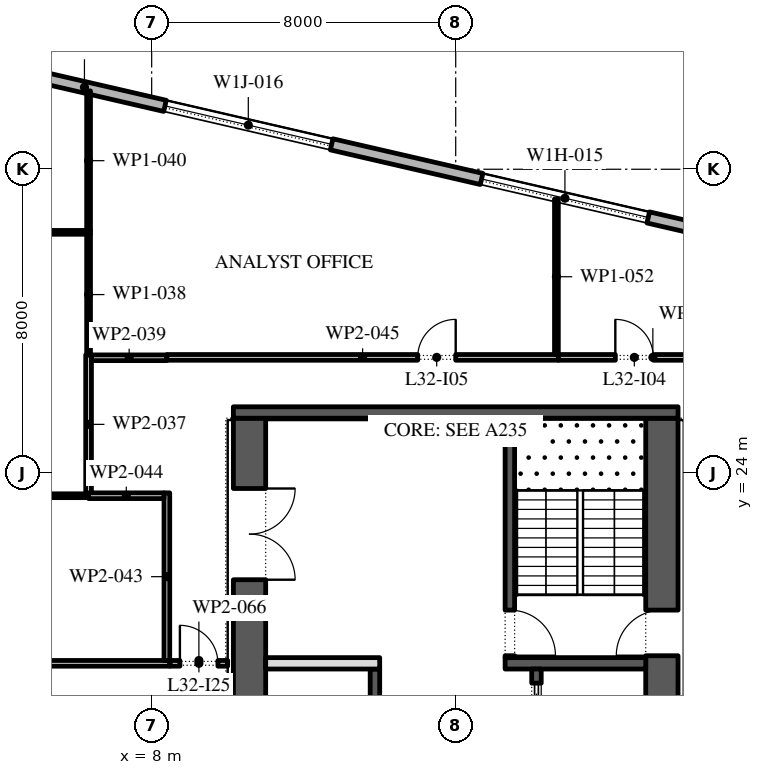
"""IFC4 building model, lengths in metres.
Left out: names, types, materials, properties, quantities, classifications, styles, units other than length and angle.
Written with IfcOpenShell. Run it as: python <this file> out.ifc"""

import sys

from ifc_helpers import new_model, si_unit, direction, frame, frame_2d, origin, place, context, subcontext, project, spatial, rectangle, extrude, element, fill, save


model = new_model("IFC4")
c1 = context("Model", 3, precision=1e-05, world=origin(), true_north=direction((0.0, 1.0)))
c2 = subcontext(c1, "Body", "Model", "MODEL_VIEW")
j1 = project(units=[si_unit("LENGTHUNIT", "METRE"), si_unit("PLANEANGLEUNIT", "RADIAN")], contexts=[c1])
p1 = place(None, origin())
s1 = spatial("IfcSite", under=j1, at=p1, CompositionType="ELEMENT")
p2 = place(p1, origin())
s2 = spatial("IfcBuilding", under=s1, at=p2, CompositionType="ELEMENT")
p3 = place(p2, frame((0.0, 0.0, 147.6)))
s3 = spatial("IfcBuildingStorey", under=s2, at=p3, CompositionType="ELEMENT", Elevation=147.6)
p4 = place(p3, frame((31.078, 28.421, 0.0), z_axis=(0.0, 0.0, 1.0), x_axis=(-0.974370456532, 0.224949357493, 0.0)))
e1 = element("IfcWall", 1, at=p4, inside=s3, PredefinedType="STANDARD", context=c2, shape_type="SweptSolid", body=[
    extrude(rectangle(XDim=51.0, YDim=0.3, at=frame_2d((25.5, 0.0))), origin(), (0.0, 0.0, 1.0), 4.0),
])
p5 = place(p4, frame((1.875, 0.0, 0.45)))
e2 = element("IfcOpeningElement", 2, at=p5, cuts=e1, PredefinedType="OPENING", context=c2, shape_type="SweptSolid", body=[
    extrude(rectangle(XDim=4.5, YDim=2.875, at=frame_2d((2.25, 1.438))), frame((0.0, 0.16, 0.0), z_axis=(0.0, -1.0, 0.0), x_axis=(1.0, 0.0, 0.0)), (0.0, 0.0, 1.0), 0.32),
])
p6 = place(p4, frame((10.275, 0.0, 0.45)))
e3 = element("IfcOpeningElement", 3, at=p6, cuts=e1, PredefinedType="OPENING", context=c2, shape_type="SweptSolid", body=[
    extrude(rectangle(XDim=4.5, YDim=2.75, at=frame_2d((2.25, 1.375))), frame((0.0, 0.16, 0.0), z_axis=(0.0, -1.0, 0.0), x_axis=(1.0, 0.0, 0.0)), (0.0, 0.0, 1.0), 0.32),
])
p7 = place(p4, frame((18.825, 0.0, 0.45)))
e4 = element("IfcOpeningElement", 4, at=p7, cuts=e1, PredefinedType="OPENING", context=c2, shape_type="SweptSolid", body=[
    extrude(rectangle(XDim=4.5, YDim=2.675, at=frame_2d((2.25, 1.337))), frame((0.0, 0.16, 0.0), z_axis=(0.0, -1.0, 0.0), x_axis=(1.0, 0.0, 0.0)), (0.0, 0.0, 1.0), 0.32),
])
p8 = place(p4, frame((28.425, 0.0, 0.0)))
e5 = element("IfcOpeningElement", 5, at=p8, cuts=e1, PredefinedType="OPENING", context=c2, shape_type="SweptSolid", body=[
    extrude(rectangle(XDim=2.4, YDim=3.025, at=frame_2d((1.2, 1.512))), frame((0.0, 0.16, 0.0), z_axis=(0.0, -1.0, 0.0), x_axis=(1.0, 0.0, 0.0)), (0.0, 0.0, 1.0), 0.32),
])
p9 = place(p4, frame((35.925, 0.0, 0.45)))
e6 = element("IfcOpeningElement", 6, at=p9, cuts=e1, PredefinedType="OPENING", context=c2, shape_type="SweptSolid", body=[
    extrude(rectangle(XDim=4.5, YDim=2.525, at=frame_2d((2.25, 1.262))), frame((0.0, 0.16, 0.0), z_axis=(0.0, -1.0, 0.0), x_axis=(1.0, 0.0, 0.0)), (0.0, 0.0, 1.0), 0.32),
])
p10 = place(p4, frame((44.475, 0.0, 0.45)))
e7 = element("IfcOpeningElement", 7, at=p10, cuts=e1, PredefinedType="OPENING", context=c2, shape_type="SweptSolid", body=[
    extrude(rectangle(XDim=4.5, YDim=2.45, at=frame_2d((2.25, 1.225))), frame((0.0, 0.16, 0.0), z_axis=(0.0, -1.0, 0.0), x_axis=(1.0, 0.0, 0.0)), (0.0, 0.0, 1.0), 0.32),
])
p11 = place(p3, frame((21.425, -2.45, 0.0), z_axis=(0.0, 0.0, 1.0), x_axis=(0.0, 1.0, 0.0)))
e8 = element("IfcWall", 8, at=p11, inside=s3, PredefinedType="SHEAR", context=c2, shape_type="SweptSolid", body=[
    extrude(rectangle(XDim=27.9, YDim=0.85, at=frame_2d((13.95, 0.0))), origin(), (0.0, 0.0, 1.0), 4.0),
])
p12 = place(p11, frame((5.05, 0.0, 0.0)))
e9 = element("IfcOpeningElement", 9, at=p12, cuts=e8, PredefinedType="OPENING", context=c2, shape_type="SweptSolid", body=[
    extrude(rectangle(XDim=1.2, YDim=2.1, at=frame_2d((0.6, 1.05))), frame((0.0, 0.435, 0.0), z_axis=(0.0, -1.0, 0.0), x_axis=(1.0, 0.0, 0.0)), (0.0, 0.0, 1.0), 0.87),
])
p13 = place(p11, frame((21.65, 0.0, 0.0)))
e10 = element("IfcOpeningElement", 10, at=p13, cuts=e8, PredefinedType="OPENING", context=c2, shape_type="SweptSolid", body=[
    extrude(rectangle(XDim=1.2, YDim=2.1, at=frame_2d((0.6, 1.05))), frame((0.0, 0.435, 0.0), z_axis=(0.0, -1.0, 0.0), x_axis=(1.0, 0.0, 0.0)), (0.0, 0.0, 1.0), 0.87),
])
p14 = place(p3, frame((10.575, -2.45, 0.0), z_axis=(0.0, 0.0, 1.0), x_axis=(0.0, 1.0, 0.0)))
e11 = element("IfcWall", 11, at=p14, inside=s3, PredefinedType="SHEAR", context=c2, shape_type="SweptSolid", body=[
    extrude(rectangle(XDim=27.9, YDim=0.85, at=frame_2d((13.95, 0.0))), origin(), (0.0, 0.0, 1.0), 4.0),
])
p15 = place(p14, frame((23.65, 0.0, 0.0)))
e12 = element("IfcOpeningElement", 12, at=p15, cuts=e11, PredefinedType="OPENING", context=c2, shape_type="SweptSolid", body=[
    extrude(rectangle(XDim=2.4, YDim=2.1, at=frame_2d((1.2, 1.05))), frame((0.0, 0.435, 0.0), z_axis=(0.0, -1.0, 0.0), x_axis=(1.0, 0.0, 0.0)), (0.0, 0.0, 1.0), 0.87),
])
p16 = place(p14, frame((1.087, 0.0, 0.0)))
e13 = element("IfcOpeningElement", 13, at=p16, cuts=e11, PredefinedType="OPENING", context=c2, shape_type="SweptSolid", body=[
    extrude(rectangle(XDim=0.9, YDim=2.1, at=frame_2d((0.45, 1.05))), frame((0.0, 0.435, 0.0), z_axis=(0.0, -1.0, 0.0), x_axis=(1.0, 0.0, 0.0)), (0.0, 0.0, 1.0), 0.87),
])
p17 = place(p14, frame((4.262, 0.0, 0.0)))
e14 = element("IfcOpeningElement", 14, at=p17, cuts=e11, PredefinedType="OPENING", context=c2, shape_type="SweptSolid", body=[
    extrude(rectangle(XDim=1.0, YDim=2.1, at=frame_2d((0.5, 1.05))), frame((0.0, 0.435, 0.0), z_axis=(0.0, -1.0, 0.0), x_axis=(1.0, 0.0, 0.0)), (0.0, 0.0, 1.0), 0.87),
])
p18 = place(p3, frame((10.15, 25.6, 0.0), z_axis=(0.0, 0.0, 1.0), x_axis=(1.0, 0.0, 0.0)))
e15 = element("IfcWall", 15, at=p18, inside=s3, PredefinedType="SHEAR", context=c2, shape_type="SweptSolid", body=[
    extrude(rectangle(XDim=11.7, YDim=0.3, at=frame_2d((5.85, 0.0))), origin(), (0.0, 0.0, 1.0), 4.0),
])
p19 = place(p3, frame((17.3, 19.0, 0.0), z_axis=(0.0, 0.0, 1.0), x_axis=(1.0, 0.0, 0.0)))
e16 = element("IfcWall", 16, at=p19, inside=s3, PredefinedType="SHEAR", context=c2, shape_type="SweptSolid", body=[
    extrude(rectangle(XDim=3.7, YDim=0.3, at=frame_2d((1.85, 0.0))), origin(), (0.0, 0.0, 1.0), 4.0),
])
p20 = place(p3, frame((17.425, 19.15, 0.0), z_axis=(0.0, 0.0, 1.0), x_axis=(0.0, 1.0, 0.0)))
e17 = element("IfcWall", 17, at=p20, inside=s3, PredefinedType="SHEAR", context=c2, shape_type="SweptSolid", body=[
    extrude(rectangle(XDim=6.3, YDim=0.25, at=frame_2d((3.15, 0.0))), origin(), (0.0, 0.0, 1.0), 4.0),
])
p21 = place(p20, frame((0.05, 0.0, 0.0)))
e18 = element("IfcOpeningElement", 18, at=p21, cuts=e17, PredefinedType="OPENING", context=c2, shape_type="SweptSolid", body=[
    extrude(rectangle(XDim=1.2, YDim=2.1, at=frame_2d((0.6, 1.05))), frame((0.0, 0.135, 0.0), z_axis=(0.0, -1.0, 0.0), x_axis=(1.0, 0.0, 0.0)), (0.0, 0.0, 1.0), 0.27),
])
p22 = place(p3, frame((18.125, 4.15, 0.0), z_axis=(0.0, 0.0, 1.0), x_axis=(0.0, 1.0, 0.0)))
e19 = element("IfcWall", 19, at=p22, inside=s3, PredefinedType="SHEAR", context=c2, shape_type="SweptSolid", body=[
    extrude(rectangle(XDim=14.7, YDim=0.25, at=frame_2d((7.35, 0.0))), origin(), (0.0, 0.0, 1.0), 4.0),
])
p23 = place(p22, frame((0.371, 0.0, 0.0)))
e20 = element("IfcOpeningElement", 20, at=p23, cuts=e19, PredefinedType="OPENING", context=c2, shape_type="SweptSolid", body=[
    extrude(rectangle(XDim=1.1, YDim=2.1, at=frame_2d((0.55, 1.05))), frame((0.0, 0.135, 0.0), z_axis=(0.0, -1.0, 0.0), x_axis=(1.0, 0.0, 0.0)), (0.0, 0.0, 1.0), 0.27),
])
p24 = place(p22, frame((2.514, 0.0, 0.0)))
e21 = element("IfcOpeningElement", 21, at=p24, cuts=e19, PredefinedType="OPENING", context=c2, shape_type="SweptSolid", body=[
    extrude(rectangle(XDim=1.1, YDim=2.1, at=frame_2d((0.55, 1.05))), frame((0.0, 0.135, 0.0), z_axis=(0.0, -1.0, 0.0), x_axis=(1.0, 0.0, 0.0)), (0.0, 0.0, 1.0), 0.27),
])
p25 = place(p22, frame((4.657, 0.0, 0.0)))
e22 = element("IfcOpeningElement", 22, at=p25, cuts=e19, PredefinedType="OPENING", context=c2, shape_type="SweptSolid", body=[
    extrude(rectangle(XDim=1.1, YDim=2.1, at=frame_2d((0.55, 1.05))), frame((0.0, 0.135, 0.0), z_axis=(0.0, -1.0, 0.0), x_axis=(1.0, 0.0, 0.0)), (0.0, 0.0, 1.0), 0.27),
])
p26 = place(p22, frame((6.8, 0.0, 0.0)))
e23 = element("IfcOpeningElement", 23, at=p26, cuts=e19, PredefinedType="OPENING", context=c2, shape_type="SweptSolid", body=[
    extrude(rectangle(XDim=1.1, YDim=2.1, at=frame_2d((0.55, 1.05))), frame((0.0, 0.135, 0.0), z_axis=(0.0, -1.0, 0.0), x_axis=(1.0, 0.0, 0.0)), (0.0, 0.0, 1.0), 0.27),
])
p27 = place(p22, frame((8.943, 0.0, 0.0)))
e24 = element("IfcOpeningElement", 24, at=p27, cuts=e19, PredefinedType="OPENING", context=c2, shape_type="SweptSolid", body=[
    extrude(rectangle(XDim=1.1, YDim=2.1, at=frame_2d((0.55, 1.05))), frame((0.0, 0.135, 0.0), z_axis=(0.0, -1.0, 0.0), x_axis=(1.0, 0.0, 0.0)), (0.0, 0.0, 1.0), 0.27),
])
p28 = place(p22, frame((11.086, 0.0, 0.0)))
e25 = element("IfcOpeningElement", 25, at=p28, cuts=e19, PredefinedType="OPENING", context=c2, shape_type="SweptSolid", body=[
    extrude(rectangle(XDim=1.1, YDim=2.1, at=frame_2d((0.55, 1.05))), frame((0.0, 0.135, 0.0), z_axis=(0.0, -1.0, 0.0), x_axis=(1.0, 0.0, 0.0)), (0.0, 0.0, 1.0), 0.27),
])
p29 = place(p22, frame((13.229, 0.0, 0.0)))
e26 = element("IfcOpeningElement", 26, at=p29, cuts=e19, PredefinedType="OPENING", context=c2, shape_type="SweptSolid", body=[
    extrude(rectangle(XDim=1.1, YDim=2.1, at=frame_2d((0.55, 1.05))), frame((0.0, 0.135, 0.0), z_axis=(0.0, -1.0, 0.0), x_axis=(1.0, 0.0, 0.0)), (0.0, 0.0, 1.0), 0.27),
])
p30 = place(p3, frame((13.875, -2.45, 0.0), z_axis=(0.0, 0.0, 1.0), x_axis=(0.0, 1.0, 0.0)))
e27 = element("IfcWall", 27, at=p30, inside=s3, PredefinedType="SHEAR", context=c2, shape_type="SweptSolid", body=[
    extrude(rectangle(XDim=21.3, YDim=0.25, at=frame_2d((10.65, 0.0))), origin(), (0.0, 0.0, 1.0), 4.0),
])
p31 = place(p30, frame((10.196, 0.0, 0.0)))
e28 = element("IfcOpeningElement", 28, at=p31, cuts=e27, PredefinedType="OPENING", context=c2, shape_type="SweptSolid", body=[
    extrude(rectangle(XDim=0.9, YDim=2.1, at=frame_2d((0.45, 1.05))), frame((0.0, 0.135, 0.0), z_axis=(0.0, -1.0, 0.0), x_axis=(1.0, 0.0, 0.0)), (0.0, 0.0, 1.0), 0.27),
])
p32 = place(p30, frame((16.475, 0.0, 0.0)))
e29 = element("IfcOpeningElement", 29, at=p32, cuts=e27, PredefinedType="OPENING", context=c2, shape_type="SweptSolid", body=[
    extrude(rectangle(XDim=0.9, YDim=2.1, at=frame_2d((0.45, 1.05))), frame((0.0, 0.135, 0.0), z_axis=(0.0, -1.0, 0.0), x_axis=(1.0, 0.0, 0.0)), (0.0, 0.0, 1.0), 0.27),
])
p33 = place(p30, frame((6.971, 0.0, 0.0)))
e30 = element("IfcOpeningElement", 30, at=p33, cuts=e27, PredefinedType="OPENING", context=c2, shape_type="SweptSolid", body=[
    extrude(rectangle(XDim=1.1, YDim=2.1, at=frame_2d((0.55, 1.05))), frame((0.0, 0.135, 0.0), z_axis=(0.0, -1.0, 0.0), x_axis=(1.0, 0.0, 0.0)), (0.0, 0.0, 1.0), 0.27),
])
p34 = place(p3, frame((11.0, 19.0, 0.0), z_axis=(0.0, 0.0, 1.0), x_axis=(1.0, 0.0, 0.0)))
e31 = element("IfcWall", 31, at=p34, inside=s3, PredefinedType="PARTITIONING", context=c2, shape_type="SweptSolid", body=[
    extrude(rectangle(XDim=3.0, YDim=0.3, at=frame_2d((1.5, 0.0))), origin(), (0.0, 0.0, 1.0), 4.0),
])
p35 = place(p3, frame((-8.475, 19.0, 0.0), z_axis=(0.0, 0.0, 1.0), x_axis=(1.0, 0.0, 0.0)))
e32 = element("IfcWall", 32, at=p35, inside=s3, PredefinedType="PARTITIONING", context=c2, shape_type="SweptSolid", body=[
    extrude(rectangle(XDim=16.95, YDim=0.15, at=frame_2d((8.475, 0.0))), origin(), (0.0, 0.0, 1.0), 4.0),
])
p36 = place(p35, frame((4.725, 0.0, 0.0)))
e33 = element("IfcOpeningElement", 33, at=p36, cuts=e32, PredefinedType="OPENING", context=c2, shape_type="SweptSolid", body=[
    extrude(rectangle(XDim=1.0, YDim=2.1, at=frame_2d((0.5, 1.05))), frame((0.0, 0.085, 0.0), z_axis=(0.0, -1.0, 0.0), x_axis=(1.0, 0.0, 0.0)), (0.0, 0.0, 1.0), 0.17),
])
p37 = place(p3, frame((-6.265, 23.41, 0.0), z_axis=(0.0, 0.0, 1.0), x_axis=(1.0, 0.0, 0.0)))
e34 = element("IfcWall", 34, at=p37, inside=s3, PredefinedType="PARTITIONING", context=c2, shape_type="SweptSolid", body=[
    extrude(rectangle(XDim=12.605, YDim=0.1, at=frame_2d((6.302, 0.0))), origin(), (0.0, 0.0, 1.0), 4.0),
])
p38 = place(p3, frame((-6.29, 30.34, 0.0), z_axis=(0.0, 0.0, 1.0), x_axis=(1.0, 0.0, 0.0)))
e35 = element("IfcWall", 35, at=p38, inside=s3, PredefinedType="PARTITIONING", context=c2, shape_type="SweptSolid", body=[
    extrude(rectangle(XDim=12.68, YDim=0.1, at=frame_2d((6.34, 0.0))), origin(), (0.0, 0.0, 1.0), 4.0),
])
p39 = place(p38, frame((8.28, 0.0, 0.0)))
e36 = element("IfcOpeningElement", 36, at=p39, cuts=e35, PredefinedType="OPENING", context=c2, shape_type="SweptSolid", body=[
    extrude(rectangle(XDim=0.9, YDim=2.1, at=frame_2d((0.45, 1.05))), frame((0.0, 0.06, 0.0), z_axis=(0.0, -1.0, 0.0), x_axis=(1.0, 0.0, 0.0)), (0.0, 0.0, 1.0), 0.12),
])
p40 = place(p3, frame((6.34, 23.46, 0.0), z_axis=(0.0, 0.0, 1.0), x_axis=(0.0, 1.0, 0.0)))
e37 = element("IfcWall", 37, at=p40, inside=s3, PredefinedType="PARTITIONING", context=c2, shape_type="SweptSolid", body=[
    extrude(rectangle(XDim=3.655, YDim=0.15, at=frame_2d((1.828, 0.0))), origin(), (0.0, 0.0, 1.0), 4.0),
])
p41 = place(p3, frame((6.34, 27.115, 0.0), z_axis=(0.0, 0.0, 1.0), x_axis=(0.0, 1.0, 0.0)))
e38 = element("IfcWall", 38, at=p41, inside=s3, PredefinedType="PARTITIONING", context=c2, shape_type="SweptSolid", body=[
    extrude(rectangle(XDim=3.175, YDim=0.1, at=frame_2d((1.587, 0.0))), origin(), (0.0, 0.0, 1.0), 4.0),
])
p42 = place(p3, frame((6.415, 27.04, 0.0), z_axis=(0.0, 0.0, 1.0), x_axis=(1.0, 0.0, 0.0)))
e39 = element("IfcWall", 39, at=p42, inside=s3, PredefinedType="PARTITIONING", context=c2, shape_type="SweptSolid", body=[
    extrude(rectangle(XDim=1.985, YDim=0.15, at=frame_2d((0.992, 0.0))), origin(), (0.0, 0.0, 1.0), 4.0),
])
p43 = place(p3, frame((6.34, 30.39, 0.0), z_axis=(0.0, 0.0, 1.0), x_axis=(0.0, 1.0, 0.0)))
e40 = element("IfcWall", 40, at=p43, inside=s3, PredefinedType="PARTITIONING", context=c2, shape_type="SweptSolid", body=[
    extrude(rectangle(XDim=3.671, YDim=0.1, at=frame_2d((1.835, 0.0))), origin(), (0.0, 0.0, 1.0), 4.0),
])
p44 = place(p3, frame((8.4, 19.075, 0.0), z_axis=(0.0, 0.0, 1.0), x_axis=(0.0, 1.0, 0.0)))
e41 = element("IfcWall", 41, at=p44, inside=s3, PredefinedType="PARTITIONING", context=c2, shape_type="SweptSolid", body=[
    extrude(rectangle(XDim=4.41, YDim=0.15, at=frame_2d((2.205, 0.0))), origin(), (0.0, 0.0, 1.0), 4.0),
])
p45 = place(p3, frame((8.325, 23.41, 0.0), z_axis=(0.0, 0.0, 1.0), x_axis=(-1.0, 0.0, 0.0)))
e42 = element("IfcWall", 42, at=p45, inside=s3, PredefinedType="PARTITIONING", context=c2, shape_type="SweptSolid", body=[
    extrude(rectangle(XDim=1.985, YDim=0.15, at=frame_2d((0.992, 0.0))), origin(), (0.0, 0.0, 1.0), 4.0),
])
p46 = place(p3, frame((8.4, 27.05, 0.0), z_axis=(0.0, 0.0, 1.0), x_axis=(1.0, 0.0, 0.0)))
e43 = element("IfcWall", 43, at=p46, inside=s3, PredefinedType="PARTITIONING", context=c2, shape_type="SweptSolid", body=[
    extrude(rectangle(XDim=10.3, YDim=0.15, at=frame_2d((5.15, 0.0))), origin(), (0.0, 0.0, 1.0), 4.0),
])
p47 = place(p46, frame((6.6, 0.0, 0.0)))
e44 = element("IfcOpeningElement", 44, at=p47, cuts=e43, PredefinedType="OPENING", context=c2, shape_type="SweptSolid", body=[
    extrude(rectangle(XDim=1.0, YDim=2.1, at=frame_2d((0.5, 1.05))), frame((0.0, 0.085, 0.0), z_axis=(0.0, -1.0, 0.0), x_axis=(1.0, 0.0, 0.0)), (0.0, 0.0, 1.0), 0.17),
])
p48 = place(p3, frame((18.65, 27.125, 0.0), z_axis=(0.0, 0.0, 1.0), x_axis=(0.0, 1.0, 0.0)))
e45 = element("IfcWall", 45, at=p48, inside=s3, PredefinedType="PARTITIONING", context=c2, shape_type="SweptSolid", body=[
    extrude(rectangle(XDim=4.094, YDim=0.1, at=frame_2d((2.047, 0.0))), origin(), (0.0, 0.0, 1.0), 4.0),
])
p49 = place(p3, frame((18.7, 27.05, 0.0), z_axis=(0.0, 0.0, 1.0), x_axis=(1.0, 0.0, 0.0)))
e46 = element("IfcWall", 46, at=p49, inside=s3, PredefinedType="PARTITIONING", context=c2, shape_type="SweptSolid", body=[
    extrude(rectangle(XDim=4.975, YDim=0.15, at=frame_2d((2.488, 0.0))), origin(), (0.0, 0.0, 1.0), 4.0),
])
p50 = place(p49, frame((1.5, 0.0, 0.0)))
e47 = element("IfcOpeningElement", 47, at=p50, cuts=e46, PredefinedType="OPENING", context=c2, shape_type="SweptSolid", body=[
    extrude(rectangle(XDim=1.0, YDim=2.1, at=frame_2d((0.5, 1.05))), frame((0.0, 0.085, 0.0), z_axis=(0.0, -1.0, 0.0), x_axis=(1.0, 0.0, 0.0)), (0.0, 0.0, 1.0), 0.17),
])
p51 = place(p3, frame((8.485, 19.0, 0.0), z_axis=(0.0, 0.0, 1.0), x_axis=(1.0, 0.0, 0.0)))
e48 = element("IfcWall", 48, at=p51, inside=s3, PredefinedType="PARTITIONING", context=c2, shape_type="SweptSolid", body=[
    extrude(rectangle(XDim=1.515, YDim=0.15, at=frame_2d((0.757, 0.0))), origin(), (0.0, 0.0, 1.0), 4.0),
])
p52 = place(p51, frame((0.258, 0.0, 0.0)))
e49 = element("IfcOpeningElement", 49, at=p52, cuts=e48, PredefinedType="OPENING", context=c2, shape_type="SweptSolid", body=[
    extrude(rectangle(XDim=1.0, YDim=2.1, at=frame_2d((0.5, 1.05))), frame((0.0, 0.085, 0.0), z_axis=(0.0, -1.0, 0.0), x_axis=(1.0, 0.0, 0.0)), (0.0, 0.0, 1.0), 0.17),
])
p53 = place(p6, origin())
e50 = element("IfcWindow", 50, at=p53, inside=s3, PartitioningType="DOUBLE_PANEL_VERTICAL", PredefinedType="WINDOW", context=c2, shape_type="SweptSolid", body=[
    extrude(rectangle(XDim=4.5, YDim=2.75, at=frame_2d((2.25, 1.375))), frame((0.0, 0.03, 0.0), z_axis=(0.0, -1.0, 0.0), x_axis=(1.0, 0.0, 0.0)), (0.0, 0.0, 1.0), 0.06),
])
fill(e3, e50)
p54 = place(p7, origin())
e51 = element("IfcWindow", 51, at=p54, inside=s3, PartitioningType="DOUBLE_PANEL_VERTICAL", PredefinedType="WINDOW", context=c2, shape_type="SweptSolid", body=[
    extrude(rectangle(XDim=4.5, YDim=2.675, at=frame_2d((2.25, 1.337))), frame((0.0, 0.03, 0.0), z_axis=(0.0, -1.0, 0.0), x_axis=(1.0, 0.0, 0.0)), (0.0, 0.0, 1.0), 0.06),
])
fill(e4, e51)
p55 = place(p29, origin())
e52 = element("IfcDoor", 52, at=p55, inside=s3, OperationType="SLIDING_TO_LEFT", PredefinedType="DOOR", context=c2, shape_type="SweptSolid", body=[
    extrude(rectangle(XDim=1.1, YDim=2.1, at=frame_2d((0.55, 1.05))), frame((0.0, 0.025, 0.0), z_axis=(0.0, -1.0, 0.0), x_axis=(1.0, 0.0, 0.0)), (0.0, 0.0, 1.0), 0.05),
])
fill(e26, e52)
p56 = place(p15, frame((2.4, 0.0, 0.0), z_axis=(0.0, 0.0, 1.0), x_axis=(-1.0, 0.0, 0.0)))
e53 = element("IfcDoor", 53, at=p56, inside=s3, OperationType="DOUBLE_DOOR_SINGLE_SWING", PredefinedType="DOOR", context=c2, shape_type="SweptSolid", body=[
    extrude(rectangle(XDim=2.4, YDim=2.1, at=frame_2d((1.2, 1.05))), frame((0.0, 0.025, 0.0), z_axis=(0.0, -1.0, 0.0), x_axis=(1.0, 0.0, 0.0)), (0.0, 0.0, 1.0), 0.05),
])
fill(e12, e53)
p57 = place(p21, frame((1.2, 0.0, 0.0), z_axis=(0.0, 0.0, 1.0), x_axis=(-1.0, 0.0, 0.0)))
e54 = element("IfcDoor", 54, at=p57, inside=s3, OperationType="SINGLE_SWING_LEFT", PredefinedType="DOOR", context=c2, shape_type="SweptSolid", body=[
    extrude(rectangle(XDim=1.2, YDim=2.1, at=frame_2d((0.6, 1.05))), frame((0.0, 0.025, 0.0), z_axis=(0.0, -1.0, 0.0), x_axis=(1.0, 0.0, 0.0)), (0.0, 0.0, 1.0), 0.05),
])
fill(e18, e54)
p58 = place(p13, origin())
e55 = element("IfcDoor", 55, at=p58, inside=s3, OperationType="SINGLE_SWING_RIGHT", PredefinedType="DOOR", context=c2, shape_type="SweptSolid", body=[
    extrude(rectangle(XDim=1.2, YDim=2.1, at=frame_2d((0.6, 1.05))), frame((0.0, 0.025, 0.0), z_axis=(0.0, -1.0, 0.0), x_axis=(1.0, 0.0, 0.0)), (0.0, 0.0, 1.0), 0.05),
])
fill(e10, e55)
p59 = place(p50, origin())
e56 = element("IfcDoor", 56, at=p59, inside=s3, OperationType="SINGLE_SWING_RIGHT", PredefinedType="DOOR", context=c2, shape_type="SweptSolid", body=[
    extrude(rectangle(XDim=1.0, YDim=2.1, at=frame_2d((0.5, 1.05))), frame((0.0, 0.025, 0.0), z_axis=(0.0, -1.0, 0.0), x_axis=(1.0, 0.0, 0.0)), (0.0, 0.0, 1.0), 0.05),
])
fill(e47, e56)
p60 = place(p47, origin())
e57 = element("IfcDoor", 57, at=p60, inside=s3, OperationType="SINGLE_SWING_LEFT", PredefinedType="DOOR", context=c2, shape_type="SweptSolid", body=[
    extrude(rectangle(XDim=1.0, YDim=2.1, at=frame_2d((0.5, 1.05))), frame((0.0, 0.025, 0.0), z_axis=(0.0, -1.0, 0.0), x_axis=(1.0, 0.0, 0.0)), (0.0, 0.0, 1.0), 0.05),
])
fill(e44, e57)
p61 = place(p52, origin())
e58 = element("IfcDoor", 58, at=p61, inside=s3, OperationType="SINGLE_SWING_RIGHT", PredefinedType="DOOR", context=c2, shape_type="SweptSolid", body=[
    extrude(rectangle(XDim=1.0, YDim=2.1, at=frame_2d((0.5, 1.05))), frame((0.0, 0.025, 0.0), z_axis=(0.0, -1.0, 0.0), x_axis=(1.0, 0.0, 0.0)), (0.0, 0.0, 1.0), 0.05),
])
fill(e49, e58)
save(model, sys.argv[1])
